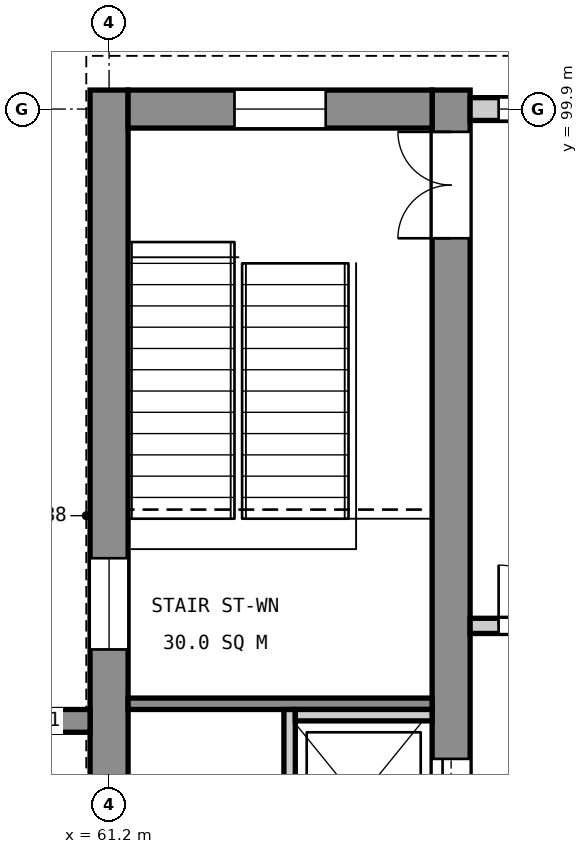
"""IFC4 building model, lengths in metres.
Left out: names, types, materials, properties, quantities, classifications, styles, units other than length and angle.
Written with IfcOpenShell. Run it as: python <this file> out.ifc"""

import sys

from ifc_helpers import new_model, si_unit, direction, frame, frame_2d, origin, place, context, subcontext, project, spatial, rectangle, extrude, element, fill, save


model = new_model("IFC4")
c1 = context("Model", 3, precision=1e-05, world=origin(), true_north=direction((0.0, 1.0)))
c2 = subcontext(c1, "Body", "Model", "MODEL_VIEW")
j1 = project(units=[si_unit("LENGTHUNIT", "METRE"), si_unit("PLANEANGLEUNIT", "RADIAN")], contexts=[c1])
p1 = place(None, origin())
s1 = spatial("IfcSite", under=j1, at=p1, CompositionType="ELEMENT")
p2 = place(p1, origin())
s2 = spatial("IfcBuilding", under=s1, at=p2, CompositionType="ELEMENT")
p3 = place(p2, frame((0.0, 0.0, 27.0)))
s3 = spatial("IfcBuildingStorey", under=s2, at=p3, CompositionType="ELEMENT", Elevation=27.0)
p4 = place(p3, frame((61.2, 88.85, 0.0), z_axis=(0.0, 0.0, 1.0), x_axis=(0.0, 1.0, 0.0)))
e1 = element("IfcWall", 1, at=p4, inside=s3, PredefinedType="SHEAR", context=c2, shape_type="SweptSolid", body=[
    extrude(rectangle(XDim=11.3, YDim=0.5, at=frame_2d((5.65, 0.0))), origin(), (0.0, 0.0, 1.0), 4.55),
])
p5 = place(p4, frame((3.94, 0.0, 3.4)))
e2 = element("IfcOpeningElement", 2, at=p5, cuts=e1, PredefinedType="OPENING", context=c2, shape_type="SweptSolid", body=[
    extrude(rectangle(XDim=1.2, YDim=0.9, at=frame_2d((0.6, 0.45))), frame((0.0, 0.26, 0.0), z_axis=(0.0, -1.0, 0.0), x_axis=(1.0, 0.0, 0.0)), (0.0, 0.0, 1.0), 0.52),
])
p6 = place(p3, frame((65.7, 88.85, 0.0), z_axis=(0.0, 0.0, 1.0), x_axis=(0.0, 1.0, 0.0)))
e3 = element("IfcWall", 3, at=p6, inside=s3, PredefinedType="SHEAR", context=c2, shape_type="SweptSolid", body=[
    extrude(rectangle(XDim=11.3, YDim=0.5, at=frame_2d((5.65, 0.0))), origin(), (0.0, 0.0, 1.0), 4.55),
])
p7 = place(p6, frame((9.35, 0.0, 0.0)))
e4 = element("IfcOpeningElement", 4, at=p7, cuts=e3, PredefinedType="OPENING", context=c2, shape_type="SweptSolid", body=[
    extrude(rectangle(XDim=1.4, YDim=2.1, at=frame_2d((0.7, 1.05))), frame((0.0, 0.26, 0.0), z_axis=(0.0, -1.0, 0.0), x_axis=(1.0, 0.0, 0.0)), (0.0, 0.0, 1.0), 0.52),
])
p8 = place(p6, frame((1.4, 0.0, 0.0)))
e5 = element("IfcOpeningElement", 5, at=p8, cuts=e3, PredefinedType="OPENING", context=c2, shape_type="SweptSolid", body=[
    extrude(rectangle(XDim=1.1, YDim=2.1, at=frame_2d((0.55, 1.05))), frame((0.0, 0.26, 0.0), z_axis=(0.0, -1.0, 0.0), x_axis=(1.0, 0.0, 0.0)), (0.0, 0.0, 1.0), 0.52),
])
p9 = place(p3, frame((61.45, 99.9, 0.0), z_axis=(0.0, 0.0, 1.0), x_axis=(1.0, 0.0, 0.0)))
e6 = element("IfcWall", 6, at=p9, inside=s3, PredefinedType="SHEAR", context=c2, shape_type="SweptSolid", body=[
    extrude(rectangle(XDim=4.0, YDim=0.5, at=frame_2d((2.0, 0.0))), origin(), (0.0, 0.0, 1.0), 4.55),
])
p10 = place(p9, frame((1.4, 0.0, 3.4)))
e7 = element("IfcOpeningElement", 7, at=p10, cuts=e6, PredefinedType="OPENING", context=c2, shape_type="SweptSolid", body=[
    extrude(rectangle(XDim=1.2, YDim=0.9, at=frame_2d((0.6, 0.45))), frame((0.0, 0.26, 0.0), z_axis=(0.0, -1.0, 0.0), x_axis=(1.0, 0.0, 0.0)), (0.0, 0.0, 1.0), 0.52),
])
p11 = place(p3, frame((60.95, 91.85, 0.0), z_axis=(0.0, 0.0, 1.0), x_axis=(-1.0, 0.0, 0.0)))
e8 = element("IfcWall", 8, at=p11, inside=s3, PredefinedType="SHEAR", context=c2, shape_type="SweptSolid", body=[
    extrude(rectangle(XDim=1.25, YDim=0.3, at=frame_2d((0.625, 0.0))), origin(), (0.0, 0.0, 1.0), 4.8),
])
p12 = place(p3, frame((61.45, 92.075, 0.0), z_axis=(0.0, 0.0, 1.0), x_axis=(1.0, 0.0, 0.0)))
e9 = element("IfcWall", 9, at=p12, inside=s3, PredefinedType="SOLIDWALL", context=c2, shape_type="SweptSolid", body=[
    extrude(rectangle(XDim=4.0, YDim=0.15, at=frame_2d((2.0, 0.0))), origin(), (0.0, 0.0, 1.0), 4.55),
])
p13 = place(p3, frame((63.575, 92.0, 0.0), z_axis=(0.0, 0.0, 1.0), x_axis=(0.0, -1.0, 0.0)))
e10 = element("IfcWall", 10, at=p13, inside=s3, PredefinedType="SOLIDWALL", context=c2, shape_type="SweptSolid", body=[
    extrude(rectangle(XDim=2.65, YDim=0.15, at=frame_2d((1.325, 0.0))), origin(), (0.0, 0.0, 1.0), 4.8),
])
p14 = place(p3, frame((63.65, 91.925, 0.0), z_axis=(0.0, 0.0, 1.0), x_axis=(1.0, 0.0, 0.0)))
e11 = element("IfcWall", 11, at=p14, inside=s3, PredefinedType="SOLIDWALL", context=c2, shape_type="SweptSolid", body=[
    extrude(rectangle(XDim=1.8, YDim=0.15, at=frame_2d((0.9, 0.0))), origin(), (0.0, 0.0, 1.0), 4.8),
])
p15 = place(p3, frame((65.95, 99.9, 0.0), z_axis=(0.0, 0.0, 1.0), x_axis=(1.0, 0.0, 0.0)))
e12 = element("IfcWall", 12, at=p15, inside=s3, PredefinedType="STANDARD", context=c2, shape_type="SweptSolid", body=[
    extrude(rectangle(XDim=1.95, YDim=0.3, at=frame_2d((0.975, 0.0))), origin(), (0.0, 0.0, 1.0), 3.85),
])
p16 = place(p15, frame((0.375, 0.0, 0.9)))
e13 = element("IfcOpeningElement", 13, at=p16, cuts=e12, PredefinedType="OPENING", context=c2, shape_type="SweptSolid", body=[
    extrude(rectangle(XDim=1.2, YDim=2.4, at=frame_2d((0.6, 1.2))), frame((0.0, 0.16, 0.0), z_axis=(0.0, -1.0, 0.0), x_axis=(1.0, 0.0, 0.0)), (0.0, 0.0, 1.0), 0.32),
])
p17 = place(p3, frame((65.95, 93.1, 0.0), z_axis=(0.0, 0.0, 1.0), x_axis=(1.0, 0.0, 0.0)))
e14 = element("IfcWall", 14, at=p17, inside=s3, PredefinedType="PARTITIONING", context=c2, shape_type="SweptSolid", body=[
    extrude(rectangle(XDim=2.35, YDim=0.2, at=frame_2d((1.175, 0.0))), origin(), (0.0, 0.0, 1.0), 3.55),
])
p18 = place(p17, frame((0.375, 0.0, 0.0)))
e15 = element("IfcOpeningElement", 15, at=p18, cuts=e14, PredefinedType="OPENING", context=c2, shape_type="SweptSolid", body=[
    extrude(rectangle(XDim=1.6, YDim=2.1, at=frame_2d((0.8, 1.05))), frame((0.0, 0.11, 0.0), z_axis=(0.0, -1.0, 0.0), x_axis=(1.0, 0.0, 0.0)), (0.0, 0.0, 1.0), 0.22),
])
p19 = place(p7, origin())
e16 = element("IfcDoor", 16, at=p19, inside=s3, OperationType="DOUBLE_DOOR_SINGLE_SWING", PredefinedType="DOOR", context=c2, shape_type="SweptSolid", body=[
    extrude(rectangle(XDim=1.4, YDim=2.1, at=frame_2d((0.7, 1.05))), frame((0.0, 0.025, 0.0), z_axis=(0.0, -1.0, 0.0), x_axis=(1.0, 0.0, 0.0)), (0.0, 0.0, 1.0), 0.05),
])
fill(e4, e16)
p20 = place(p8, origin())
e17 = element("IfcDoor", 17, at=p20, inside=s3, OperationType="SLIDING_TO_LEFT", PredefinedType="DOOR", context=c2, shape_type="SweptSolid", body=[
    extrude(rectangle(XDim=1.1, YDim=2.1, at=frame_2d((0.55, 1.05))), frame((0.0, 0.025, 0.0), z_axis=(0.0, -1.0, 0.0), x_axis=(1.0, 0.0, 0.0)), (0.0, 0.0, 1.0), 0.05),
])
fill(e5, e17)
p21 = place(p16, origin())
e18 = element("IfcWindow", 18, at=p21, inside=s3, PartitioningType="SINGLE_PANEL", PredefinedType="WINDOW", context=c2, shape_type="SweptSolid", body=[
    extrude(rectangle(XDim=1.2, YDim=2.4, at=frame_2d((0.6, 1.2))), frame((0.0, 0.03, 0.0), z_axis=(0.0, -1.0, 0.0), x_axis=(1.0, 0.0, 0.0)), (0.0, 0.0, 1.0), 0.06),
])
fill(e13, e18)
p22 = place(p5, origin())
e19 = element("IfcWindow", 19, at=p22, inside=s3, PartitioningType="SINGLE_PANEL", PredefinedType="WINDOW", context=c2, shape_type="SweptSolid", body=[
    extrude(rectangle(XDim=1.2, YDim=0.9, at=frame_2d((0.6, 0.45))), frame((0.0, 0.03, 0.0), z_axis=(0.0, -1.0, 0.0), x_axis=(1.0, 0.0, 0.0)), (0.0, 0.0, 1.0), 0.06),
])
fill(e2, e19)
p23 = place(p10, origin())
e20 = element("IfcWindow", 20, at=p23, inside=s3, PartitioningType="SINGLE_PANEL", PredefinedType="WINDOW", context=c2, shape_type="SweptSolid", body=[
    extrude(rectangle(XDim=1.2, YDim=0.9, at=frame_2d((0.6, 0.45))), frame((0.0, 0.03, 0.0), z_axis=(0.0, -1.0, 0.0), x_axis=(1.0, 0.0, 0.0)), (0.0, 0.0, 1.0), 0.06),
])
fill(e7, e20)
p24 = place(p18, origin())
e21 = element("IfcDoor", 21, at=p24, inside=s3, OperationType="DOUBLE_DOOR_SINGLE_SWING", PredefinedType="DOOR", context=c2, shape_type="SweptSolid", body=[
    extrude(rectangle(XDim=1.6, YDim=2.1, at=frame_2d((0.8, 1.05))), frame((0.0, 0.025, 0.0), z_axis=(0.0, -1.0, 0.0), x_axis=(1.0, 0.0, 0.0)), (0.0, 0.0, 1.0), 0.05),
])
fill(e15, e21)
save(model, sys.argv[1])
